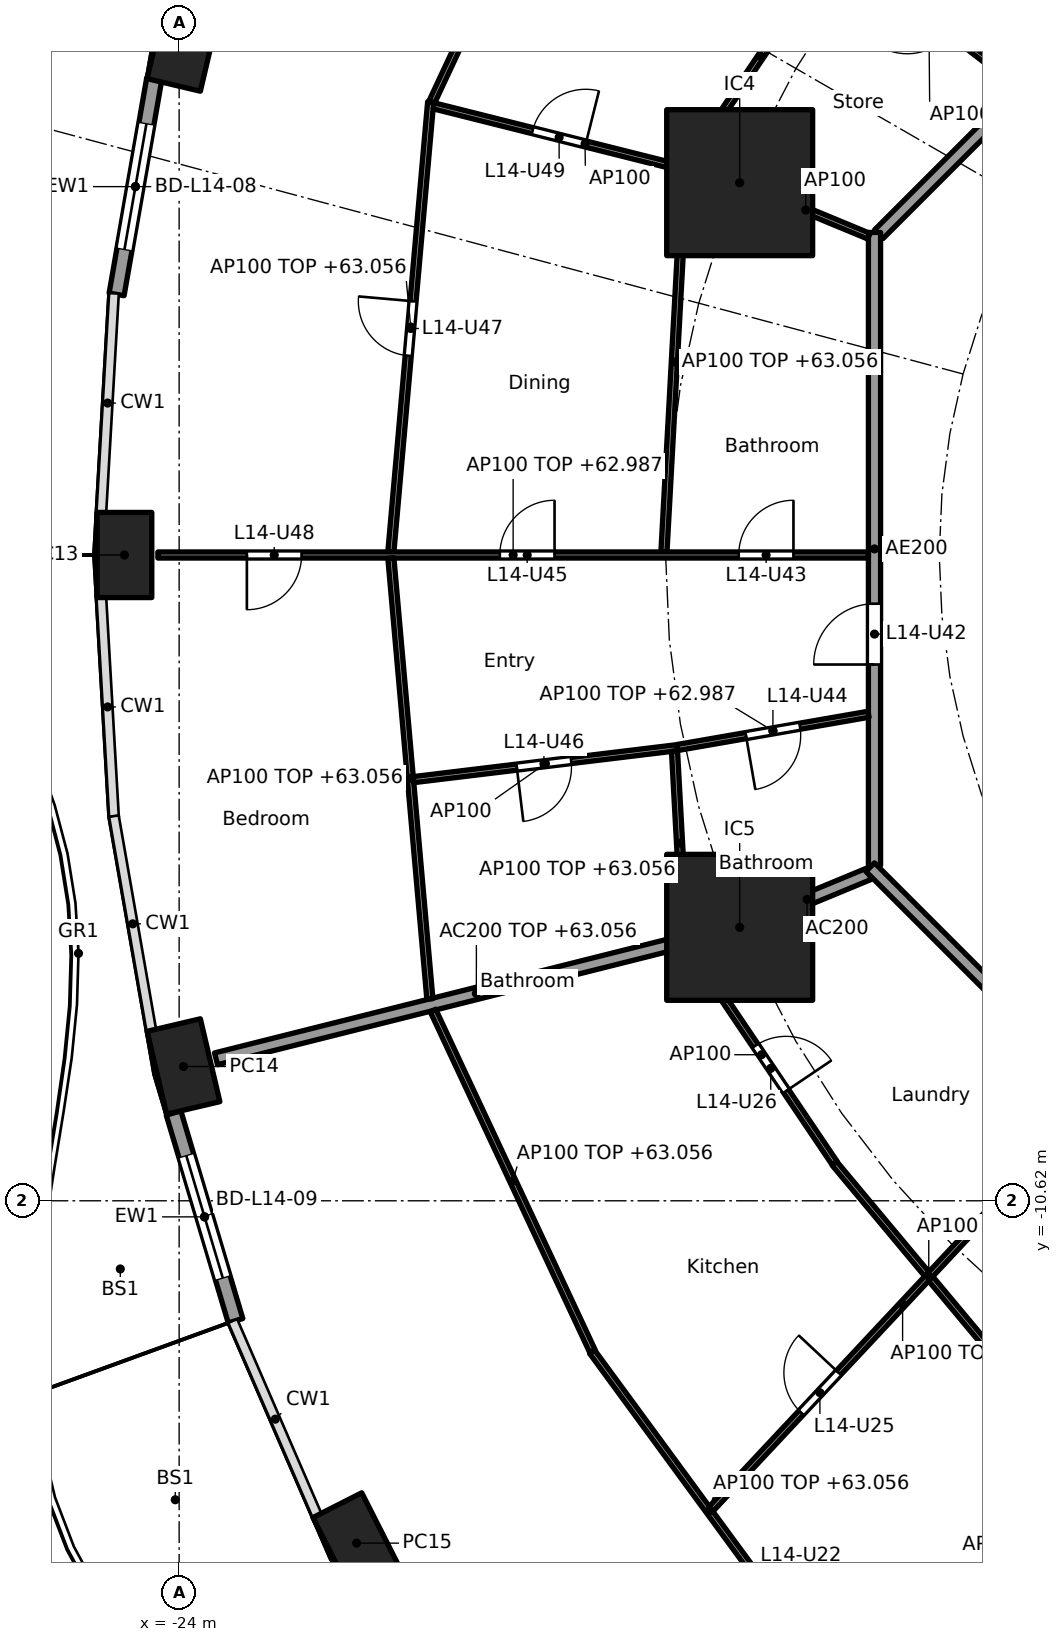
"""IFC4 building model, lengths in metres.
Left out: names, types, materials, properties, quantities, classifications, styles, units other than length and angle.
Written with IfcOpenShell. Run it as: python <this file> out.ifc"""

import sys

from ifc_helpers import new_model, si_unit, direction, frame, frame_2d, origin, origin_2d, place, context, subcontext, project, spatial, rectangle, hollow_rectangle, extrude, element, fill, save


model = new_model("IFC4")
c1 = context("Model", 3, precision=1e-05, world=origin(), true_north=direction((0.0, 1.0)))
c2 = subcontext(c1, "Body", "Model", "MODEL_VIEW")
j1 = project(units=[si_unit("LENGTHUNIT", "METRE"), si_unit("PLANEANGLEUNIT", "RADIAN")], contexts=[c1])
p1 = place(None, origin())
s1 = spatial("IfcSite", under=j1, at=p1, CompositionType="ELEMENT")
p2 = place(p1, origin())
s2 = spatial("IfcBuilding", under=s1, at=p2, CompositionType="ELEMENT")
p3 = place(p2, frame((0.0, 0.0, 60.3)))
s3 = spatial("IfcBuildingStorey", under=s2, at=p3, CompositionType="ELEMENT", Elevation=60.3)
for number, where, z_axis, x_axis in (
    (1, (-23.929, 8.412, 0.0), (0.0, 0.0, 1.0), (-0.229, -0.973, 0.0)),
    (2, (-24.9, 0.0, 0.0), (0.0, 0.0, 1.0), (0.0, -1.0, 0.0)),
    (3, (-23.929, -8.412, 0.0), (0.0, 0.0, 1.0), (0.229, -0.973, 0.0)),
    (4, (-21.082, -16.25, 0.0), (0.0, 0.0, 1.0), (0.452, -0.892, 0.0)),
):
    element("IfcColumn", number, at=place(p3, frame(where, z_axis=z_axis, x_axis=x_axis)), inside=s3, PredefinedType="COLUMN", context=c2, shape_type="SweptSolid", body=[
        extrude(hollow_rectangle(XDim=1.4, YDim=0.9, WallThickness=0.05, at=origin_2d()), origin(), (0.0, 0.0, 1.0), 3.7),
    ])
for number, where, z_axis, x_axis in (
    (5, (-14.782, 6.123, 0.0), (0.0, 0.0, 1.0), (1.0, 0.0, 0.0)),
    (6, (-14.782, -6.123, 0.0), (0.0, 0.0, 1.0), (1.0, 0.0, 0.0)),
):
    element("IfcColumn", number, at=place(p3, frame(where, z_axis=z_axis, x_axis=x_axis)), inside=s3, PredefinedType="COLUMN", context=c2, shape_type="SweptSolid", body=[
        extrude(rectangle(XDim=2.4, YDim=2.4, at=origin_2d()), origin(), (0.0, 0.0, 1.0), 3.7),
    ])
p4 = place(p3, frame((-25.029, 4.286, 0.0), z_axis=(0.0, 0.0, 1.0), x_axis=(0.172217377323, 0.98505897029, 0.0)))
e7 = element("IfcWall", 7, at=p4, inside=s3, PredefinedType="SOLIDWALL", context=c2, shape_type="SweptSolid", body=[
    extrude(rectangle(XDim=3.598, YDim=0.25, at=frame_2d((1.799, 0.0))), origin(), (0.0, 0.0, 1.0), 3.44),
])
p5 = place(p4, frame((0.749, 0.0, 0.0)))
e8 = element("IfcOpeningElement", 8, at=p5, cuts=e7, PredefinedType="OPENING", context=c2, shape_type="SweptSolid", body=[
    extrude(rectangle(XDim=2.1, YDim=2.4, at=frame_2d((1.05, 1.2))), frame((0.0, 0.135, 0.0), z_axis=(0.0, -1.0, 0.0), x_axis=(1.0, 0.0, 0.0)), (0.0, 0.0, 1.0), 0.27),
])
p6 = place(p3, frame((-23.073, -12.593, 0.0), z_axis=(0.0, 0.0, 1.0), x_axis=(-0.285871309426, 0.958268018065, 0.0)))
e9 = element("IfcWall", 9, at=p6, inside=s3, PredefinedType="SOLIDWALL", context=c2, shape_type="SweptSolid", body=[
    extrude(rectangle(XDim=3.565, YDim=0.25, at=frame_2d((1.783, 0.0))), origin(), (0.0, 0.0, 1.0), 3.44),
])
p7 = place(p6, frame((0.733, 0.0, 0.0)))
e10 = element("IfcOpeningElement", 10, at=p7, cuts=e9, PredefinedType="OPENING", context=c2, shape_type="SweptSolid", body=[
    extrude(rectangle(XDim=2.1, YDim=2.4, at=frame_2d((1.05, 1.2))), frame((0.0, 0.135, 0.0), z_axis=(0.0, -1.0, 0.0), x_axis=(1.0, 0.0, 0.0)), (0.0, 0.0, 1.0), 0.27),
])
p8 = place(p3, frame((-12.657, -5.243, 0.0), z_axis=(0.0, 0.0, 1.0), x_axis=(-0.923885664896, -0.382668627144, 0.0)))
e11 = element("IfcWall", 11, at=p8, inside=s3, PredefinedType="PARTITIONING", context=c2, shape_type="SweptSolid", body=[
    extrude(rectangle(XDim=2.2, YDim=0.2, at=frame_2d((1.1, 0.0))), origin(), (0.0, 0.0, 1.0), 3.44),
])
p9 = place(p3, frame((-14.831, -6.135, 0.0), z_axis=(0.0, 0.0, 1.0), x_axis=(-0.969884949569, -0.243563512454, 0.0)))
e12 = element("IfcWall", 12, at=p9, inside=s3, PredefinedType="PARTITIONING", context=c2, shape_type="SweptSolid", body=[
    extrude(rectangle(XDim=8.829, YDim=0.2, at=frame_2d((4.415, 0.0))), origin(), (0.0, 0.0, 1.0), 2.756),
])
p10 = place(p3, frame((-5.275, 12.494, 0.0), z_axis=(0.0, 0.0, 1.0), x_axis=(-0.707106781187, -0.707106781187, 0.0)))
e13 = element("IfcWall", 13, at=p10, inside=s3, PredefinedType="PARTITIONING", context=c2, shape_type="SweptSolid", body=[
    extrude(rectangle(XDim=10.209, YDim=0.2, at=frame_2d((5.104, 0.0))), origin(), (0.0, 0.0, 1.0), 3.44),
])
p11 = place(p3, frame((-12.565, 5.304, 0.0), z_axis=(0.0, 0.0, 1.0), x_axis=(0.0, -1.0, 0.0)))
e14 = element("IfcWall", 14, at=p11, inside=s3, PredefinedType="PARTITIONING", context=c2, shape_type="SweptSolid", body=[
    extrude(rectangle(XDim=10.409, YDim=0.2, at=frame_2d((5.205, 0.0))), origin(), (0.0, 0.0, 1.0), 3.44),
])
p12 = place(p11, frame((6.106, 0.0, 0.0)))
e15 = element("IfcOpeningElement", 15, at=p12, cuts=e14, PredefinedType="OPENING", context=c2, shape_type="SweptSolid", body=[
    extrude(rectangle(XDim=1.0, YDim=2.1, at=frame_2d((0.5, 1.05))), frame((0.0, 0.11, 0.0), z_axis=(0.0, -1.0, 0.0), x_axis=(1.0, 0.0, 0.0)), (0.0, 0.0, 1.0), 0.22),
])
p13 = place(p3, frame((-12.635, -5.134, 0.0), z_axis=(0.0, 0.0, 1.0), x_axis=(0.707106781187, -0.707106781187, 0.0)))
e16 = element("IfcWall", 16, at=p13, inside=s3, PredefinedType="PARTITIONING", context=c2, shape_type="SweptSolid", body=[
    extrude(rectangle(XDim=10.609, YDim=0.2, at=frame_2d((5.305, 0.0))), origin(), (0.0, 0.0, 1.0), 3.44),
])
p14 = place(p3, frame((-10.19, 7.719, 0.0), z_axis=(0.0, 0.0, 1.0), x_axis=(-0.790253294643, 0.612780327937, 0.0)))
e17 = element("IfcWall", 17, at=p14, inside=s3, PredefinedType="PARTITIONING", context=c2, shape_type="SweptSolid", body=[
    extrude(rectangle(XDim=3.746, YDim=0.1, at=frame_2d((1.873, 0.0))), origin(), (0.0, 0.0, 1.0), 2.687),
])
p15 = place(p14, frame((1.423, 0.0, 0.0)))
e18 = element("IfcOpeningElement", 18, at=p15, cuts=e17, PredefinedType="OPENING", context=c2, shape_type="SweptSolid", body=[
    extrude(rectangle(XDim=0.9, YDim=2.1, at=frame_2d((0.45, 1.05))), frame((0.0, 0.06, 0.0), z_axis=(0.0, -1.0, 0.0), x_axis=(1.0, 0.0, 0.0)), (0.0, 0.0, 1.0), 0.12),
])
p16 = place(p3, frame((-13.218, 10.004, 0.0), z_axis=(0.0, 0.0, 1.0), x_axis=(-0.559126445155, -0.82908239538, 0.0)))
e19 = element("IfcWall", 19, at=p16, inside=s3, PredefinedType="PARTITIONING", context=c2, shape_type="SweptSolid", body=[
    extrude(rectangle(XDim=4.358, YDim=0.1, at=frame_2d((2.179, 0.0))), origin(), (0.0, 0.0, 1.0), 3.44),
])
p17 = place(p3, frame((-17.203, 13.095, 0.0), z_axis=(0.0, 0.0, 1.0), x_axis=(-0.423892287987, -0.905712607942, 0.0)))
e20 = element("IfcWall", 20, at=p17, inside=s3, PredefinedType="PARTITIONING", context=c2, shape_type="SweptSolid", body=[
    extrude(rectangle(XDim=6.238, YDim=0.1, at=frame_2d((3.119, 0.0))), origin(), (0.0, 0.0, 1.0), 2.756),
])
p18 = place(p3, frame((-12.657, 5.243, 0.0), z_axis=(0.0, 0.0, 1.0), x_axis=(-0.923864733477, 0.382719158442, 0.0)))
e21 = element("IfcWall", 21, at=p18, inside=s3, PredefinedType="PARTITIONING", context=c2, shape_type="SweptSolid", body=[
    extrude(rectangle(XDim=2.25, YDim=0.1, at=frame_2d((1.125, 0.0))), origin(), (0.0, 0.0, 1.0), 3.44),
])
p19 = place(p3, frame((-14.831, 6.135, 0.0), z_axis=(0.0, 0.0, 1.0), x_axis=(-0.96988230015, 0.243574062362, 0.0)))
e22 = element("IfcWall", 22, at=p19, inside=s3, PredefinedType="PARTITIONING", context=c2, shape_type="SweptSolid", body=[
    extrude(rectangle(XDim=5.144, YDim=0.1, at=frame_2d((2.572, 0.0))), origin(), (0.0, 0.0, 1.0), 3.44),
])
p20 = place(p19, frame((2.561, 0.0, 0.0)))
e23 = element("IfcOpeningElement", 23, at=p20, cuts=e22, PredefinedType="OPENING", context=c2, shape_type="SweptSolid", body=[
    extrude(rectangle(XDim=0.9, YDim=2.1, at=frame_2d((0.45, 1.05))), frame((0.0, 0.06, 0.0), z_axis=(0.0, -1.0, 0.0), x_axis=(1.0, 0.0, 0.0)), (0.0, 0.0, 1.0), 0.12),
])
p21 = place(p3, frame((-15.686, 6.299, 0.0), z_axis=(0.0, 0.0, 1.0), x_axis=(-0.054651178503, -0.99850550759, 0.0)))
e24 = element("IfcWall", 24, at=p21, inside=s3, PredefinedType="PARTITIONING", context=c2, shape_type="SweptSolid", body=[
    extrude(rectangle(XDim=6.259, YDim=0.1, at=frame_2d((3.129, 0.0))), origin(), (0.0, 0.0, 1.0), 2.756),
])
p22 = place(p3, frame((-19.864, 7.45, 0.0), z_axis=(0.0, 0.0, 1.0), x_axis=(-0.088138375539, -0.996108240483, 0.0)))
e25 = element("IfcWall", 25, at=p22, inside=s3, PredefinedType="PARTITIONING", context=c2, shape_type="SweptSolid", body=[
    extrude(rectangle(XDim=7.429, YDim=0.1, at=frame_2d((3.714, 0.0))), origin(), (0.0, 0.0, 1.0), 2.756),
])
p23 = place(p22, frame((3.29, 0.0, 0.0)))
e26 = element("IfcOpeningElement", 26, at=p23, cuts=e25, PredefinedType="OPENING", context=c2, shape_type="SweptSolid", body=[
    extrude(rectangle(XDim=0.9, YDim=2.1, at=frame_2d((0.45, 1.05))), frame((0.0, 0.06, 0.0), z_axis=(0.0, -1.0, 0.0), x_axis=(1.0, 0.0, 0.0)), (0.0, 0.0, 1.0), 0.12),
])
p24 = place(p3, frame((-12.665, 0.0, 0.0), z_axis=(0.0, 0.0, 1.0), x_axis=(-1.0, 0.0, 0.0)))
e27 = element("IfcWall", 27, at=p24, inside=s3, PredefinedType="PARTITIONING", context=c2, shape_type="SweptSolid", body=[
    extrude(rectangle(XDim=11.685, YDim=0.1, at=frame_2d((5.843, 0.0))), origin(), (0.0, 0.0, 1.0), 2.687),
])
p25 = place(p24, frame((1.233, 0.0, 0.0)))
e28 = element("IfcOpeningElement", 28, at=p25, cuts=e27, PredefinedType="OPENING", context=c2, shape_type="SweptSolid", body=[
    extrude(rectangle(XDim=0.9, YDim=2.1, at=frame_2d((0.45, 1.05))), frame((0.0, 0.06, 0.0), z_axis=(0.0, -1.0, 0.0), x_axis=(1.0, 0.0, 0.0)), (0.0, 0.0, 1.0), 0.12),
])
p26 = place(p24, frame((5.162, 0.0, 0.0)))
e29 = element("IfcOpeningElement", 29, at=p26, cuts=e27, PredefinedType="OPENING", context=c2, shape_type="SweptSolid", body=[
    extrude(rectangle(XDim=0.9, YDim=2.1, at=frame_2d((0.45, 1.05))), frame((0.0, 0.06, 0.0), z_axis=(0.0, -1.0, 0.0), x_axis=(1.0, 0.0, 0.0)), (0.0, 0.0, 1.0), 0.12),
])
p27 = place(p24, frame((9.322, 0.0, 0.0)))
e30 = element("IfcOpeningElement", 30, at=p27, cuts=e27, PredefinedType="OPENING", context=c2, shape_type="SweptSolid", body=[
    extrude(rectangle(XDim=0.9, YDim=2.1, at=frame_2d((0.45, 1.05))), frame((0.0, 0.06, 0.0), z_axis=(0.0, -1.0, 0.0), x_axis=(1.0, 0.0, 0.0)), (0.0, 0.0, 1.0), 0.12),
])
p28 = place(p3, frame((-20.518, -0.05, 0.0), z_axis=(0.0, 0.0, 1.0), x_axis=(0.088143415068, -0.996107794558, 0.0)))
e31 = element("IfcWall", 31, at=p28, inside=s3, PredefinedType="PARTITIONING", context=c2, shape_type="SweptSolid", body=[
    extrude(rectangle(XDim=7.279, YDim=0.1, at=frame_2d((3.64, 0.0))), origin(), (0.0, 0.0, 1.0), 2.756),
])
p29 = place(p3, frame((-12.663, -2.619, 0.0), z_axis=(0.0, 0.0, 1.0), x_axis=(-0.985220176102, -0.171292745325, 0.0)))
e32 = element("IfcWall", 32, at=p29, inside=s3, PredefinedType="PARTITIONING", context=c2, shape_type="SweptSolid", body=[
    extrude(rectangle(XDim=3.191, YDim=0.1, at=frame_2d((1.596, 0.0))), origin(), (0.0, 0.0, 1.0), 2.687),
])
p30 = place(p29, frame((1.146, 0.0, 0.0)))
e33 = element("IfcOpeningElement", 33, at=p30, cuts=e32, PredefinedType="OPENING", context=c2, shape_type="SweptSolid", body=[
    extrude(rectangle(XDim=0.9, YDim=2.1, at=frame_2d((0.45, 1.05))), frame((0.0, 0.06, 0.0), z_axis=(0.0, -1.0, 0.0), x_axis=(1.0, 0.0, 0.0)), (0.0, 0.0, 1.0), 0.12),
])
p31 = place(p3, frame((-15.807, -3.168, 0.0), z_axis=(0.0, 0.0, 1.0), x_axis=(-0.992741666002, -0.120266306938, 0.0)))
e34 = element("IfcWall", 34, at=p31, inside=s3, PredefinedType="PARTITIONING", context=c2, shape_type="SweptSolid", body=[
    extrude(rectangle(XDim=4.371, YDim=0.1, at=frame_2d((2.185, 0.0))), origin(), (0.0, 0.0, 1.0), 3.44),
])
p32 = place(p31, frame((1.76, 0.0, 0.0)))
e35 = element("IfcOpeningElement", 35, at=p32, cuts=e34, PredefinedType="OPENING", context=c2, shape_type="SweptSolid", body=[
    extrude(rectangle(XDim=0.9, YDim=2.1, at=frame_2d((0.45, 1.05))), frame((0.0, 0.06, 0.0), z_axis=(0.0, -1.0, 0.0), x_axis=(1.0, 0.0, 0.0)), (0.0, 0.0, 1.0), 0.12),
])
p33 = place(p3, frame((-15.854, -3.225, 0.0), z_axis=(0.0, 0.0, 1.0), x_axis=(0.054644199943, -0.998505889523, 0.0)))
e36 = element("IfcWall", 36, at=p33, inside=s3, PredefinedType="PARTITIONING", context=c2, shape_type="SweptSolid", body=[
    extrude(rectangle(XDim=3.029, YDim=0.1, at=frame_2d((1.515, 0.0))), origin(), (0.0, 0.0, 1.0), 2.756),
])
p34 = place(p3, frame((-15.627, -6.432, 0.0), z_axis=(0.0, 0.0, 1.0), x_axis=(0.559112679527, -0.829091678641, 0.0)))
e37 = element("IfcWall", 37, at=p34, inside=s3, PredefinedType="PARTITIONING", context=c2, shape_type="SweptSolid", body=[
    extrude(rectangle(XDim=4.308, YDim=0.1, at=frame_2d((2.154, 0.0))), origin(), (0.0, 0.0, 1.0), 3.44),
])
p35 = place(p34, frame((1.975, 0.0, 0.0)))
e38 = element("IfcOpeningElement", 38, at=p35, cuts=e37, PredefinedType="OPENING", context=c2, shape_type="SweptSolid", body=[
    extrude(rectangle(XDim=0.9, YDim=2.1, at=frame_2d((0.45, 1.05))), frame((0.0, 0.06, 0.0), z_axis=(0.0, -1.0, 0.0), x_axis=(1.0, 0.0, 0.0)), (0.0, 0.0, 1.0), 0.12),
])
p36 = place(p3, frame((-19.826, -7.491, 0.0), z_axis=(0.0, 0.0, 1.0), x_axis=(0.423926333401, -0.905696673202, 0.0)))
e39 = element("IfcWall", 39, at=p36, inside=s3, PredefinedType="PARTITIONING", context=c2, shape_type="SweptSolid", body=[
    extrude(rectangle(XDim=6.188, YDim=0.1, at=frame_2d((3.094, 0.0))), origin(), (0.0, 0.0, 1.0), 2.756),
])
p37 = place(p3, frame((-13.222, -10.007, 0.0), z_axis=(0.0, 0.0, 1.0), x_axis=(0.64083455704, -0.767679015282, 0.0)))
e40 = element("IfcWall", 40, at=p37, inside=s3, PredefinedType="PARTITIONING", context=c2, shape_type="SweptSolid", body=[
    extrude(rectangle(XDim=4.837, YDim=0.1, at=frame_2d((2.418, 0.0))), origin(), (0.0, 0.0, 1.0), 2.756),
])
p38 = place(p3, frame((-17.211, -13.1, 0.0), z_axis=(0.0, 0.0, 1.0), x_axis=(0.591191311491, -0.806531359104, 0.0)))
e41 = element("IfcWall", 41, at=p38, inside=s3, PredefinedType="PARTITIONING", context=c2, shape_type="SweptSolid", body=[
    extrude(rectangle(XDim=6.51, YDim=0.1, at=frame_2d((3.255, 0.0))), origin(), (0.0, 0.0, 1.0), 2.756),
])
p39 = place(p38, frame((4.407, 0.0, 0.0)))
e42 = element("IfcOpeningElement", 42, at=p39, cuts=e41, PredefinedType="OPENING", context=c2, shape_type="SweptSolid", body=[
    extrude(rectangle(XDim=0.9, YDim=2.1, at=frame_2d((0.45, 1.05))), frame((0.0, 0.06, 0.0), z_axis=(0.0, -1.0, 0.0), x_axis=(1.0, 0.0, 0.0)), (0.0, 0.0, 1.0), 0.12),
])
p40 = place(p3, frame((-8.953, -8.958, 0.0), z_axis=(0.0, 0.0, 1.0), x_axis=(-0.683322485948, -0.730116689439, 0.0)))
e43 = element("IfcWall", 43, at=p40, inside=s3, PredefinedType="PARTITIONING", context=c2, shape_type="SweptSolid", body=[
    extrude(rectangle(XDim=9.219, YDim=0.1, at=frame_2d((4.609, 0.0))), origin(), (0.0, 0.0, 1.0), 2.687),
])
p41 = place(p40, frame((6.149, 0.0, 0.0)))
e44 = element("IfcOpeningElement", 44, at=p41, cuts=e43, PredefinedType="OPENING", context=c2, shape_type="SweptSolid", body=[
    extrude(rectangle(XDim=0.9, YDim=2.1, at=frame_2d((0.45, 1.05))), frame((0.0, 0.06, 0.0), z_axis=(0.0, -1.0, 0.0), x_axis=(1.0, 0.0, 0.0)), (0.0, 0.0, 1.0), 0.12),
])
p42 = place(p5, origin())
e45 = element("IfcDoor", 45, at=p42, inside=s3, OperationType="SLIDING_TO_LEFT", PredefinedType="DOOR", context=c2, shape_type="SweptSolid", body=[
    extrude(rectangle(XDim=2.1, YDim=2.4, at=frame_2d((1.05, 1.2))), frame((0.0, 0.025, 0.0), z_axis=(0.0, -1.0, 0.0), x_axis=(1.0, 0.0, 0.0)), (0.0, 0.0, 1.0), 0.05),
])
fill(e8, e45)
p43 = place(p7, origin())
e46 = element("IfcDoor", 46, at=p43, inside=s3, OperationType="SLIDING_TO_LEFT", PredefinedType="DOOR", context=c2, shape_type="SweptSolid", body=[
    extrude(rectangle(XDim=2.1, YDim=2.4, at=frame_2d((1.05, 1.2))), frame((0.0, 0.025, 0.0), z_axis=(0.0, -1.0, 0.0), x_axis=(1.0, 0.0, 0.0)), (0.0, 0.0, 1.0), 0.05),
])
fill(e10, e46)
p44 = place(p41, frame((0.9, 0.0, 0.0), x_axis=(-1.0, 0.0, 0.0)))
e47 = element("IfcDoor", 47, at=p44, inside=s3, OperationType="SINGLE_SWING_RIGHT", PredefinedType="DOOR", context=c2, shape_type="SweptSolid", body=[
    extrude(rectangle(XDim=0.9, YDim=2.1, at=frame_2d((0.45, 1.05))), frame((0.0, 0.025, 0.0), z_axis=(0.0, -1.0, 0.0), x_axis=(1.0, 0.0, 0.0)), (0.0, 0.0, 1.0), 0.05),
])
fill(e44, e47)
p45 = place(p35, origin())
e48 = element("IfcDoor", 48, at=p45, inside=s3, OperationType="SINGLE_SWING_RIGHT", PredefinedType="DOOR", context=c2, shape_type="SweptSolid", body=[
    extrude(rectangle(XDim=0.9, YDim=2.1, at=frame_2d((0.45, 1.05))), frame((0.0, 0.025, 0.0), z_axis=(0.0, -1.0, 0.0), x_axis=(1.0, 0.0, 0.0)), (0.0, 0.0, 1.0), 0.05),
])
fill(e38, e48)
p46 = place(p12, frame((1.0, 0.0, 0.0), x_axis=(-1.0, 0.0, 0.0)))
e49 = element("IfcDoor", 49, at=p46, inside=s3, OperationType="SINGLE_SWING_LEFT", PredefinedType="DOOR", context=c2, shape_type="SweptSolid", body=[
    extrude(rectangle(XDim=1.0, YDim=2.1, at=frame_2d((0.5, 1.05))), frame((0.0, 0.025, 0.0), z_axis=(0.0, -1.0, 0.0), x_axis=(1.0, 0.0, 0.0)), (0.0, 0.0, 1.0), 0.05),
])
fill(e15, e49)
p47 = place(p25, frame((0.9, 0.0, 0.0), x_axis=(-1.0, 0.0, 0.0)))
e50 = element("IfcDoor", 50, at=p47, inside=s3, OperationType="SINGLE_SWING_RIGHT", PredefinedType="DOOR", context=c2, shape_type="SweptSolid", body=[
    extrude(rectangle(XDim=0.9, YDim=2.1, at=frame_2d((0.45, 1.05))), frame((0.0, 0.025, 0.0), z_axis=(0.0, -1.0, 0.0), x_axis=(1.0, 0.0, 0.0)), (0.0, 0.0, 1.0), 0.05),
])
fill(e28, e50)
p48 = place(p30, origin())
e51 = element("IfcDoor", 51, at=p48, inside=s3, OperationType="SINGLE_SWING_RIGHT", PredefinedType="DOOR", context=c2, shape_type="SweptSolid", body=[
    extrude(rectangle(XDim=0.9, YDim=2.1, at=frame_2d((0.45, 1.05))), frame((0.0, 0.025, 0.0), z_axis=(0.0, -1.0, 0.0), x_axis=(1.0, 0.0, 0.0)), (0.0, 0.0, 1.0), 0.05),
])
fill(e33, e51)
p49 = place(p26, frame((0.9, 0.0, 0.0), x_axis=(-1.0, 0.0, 0.0)))
e52 = element("IfcDoor", 52, at=p49, inside=s3, OperationType="SINGLE_SWING_RIGHT", PredefinedType="DOOR", context=c2, shape_type="SweptSolid", body=[
    extrude(rectangle(XDim=0.9, YDim=2.1, at=frame_2d((0.45, 1.05))), frame((0.0, 0.025, 0.0), z_axis=(0.0, -1.0, 0.0), x_axis=(1.0, 0.0, 0.0)), (0.0, 0.0, 1.0), 0.05),
])
fill(e29, e52)
p50 = place(p32, origin())
e53 = element("IfcDoor", 53, at=p50, inside=s3, OperationType="SINGLE_SWING_RIGHT", PredefinedType="DOOR", context=c2, shape_type="SweptSolid", body=[
    extrude(rectangle(XDim=0.9, YDim=2.1, at=frame_2d((0.45, 1.05))), frame((0.0, 0.025, 0.0), z_axis=(0.0, -1.0, 0.0), x_axis=(1.0, 0.0, 0.0)), (0.0, 0.0, 1.0), 0.05),
])
fill(e35, e53)
p51 = place(p23, frame((0.9, 0.0, 0.0), x_axis=(-1.0, 0.0, 0.0)))
e54 = element("IfcDoor", 54, at=p51, inside=s3, OperationType="SINGLE_SWING_RIGHT", PredefinedType="DOOR", context=c2, shape_type="SweptSolid", body=[
    extrude(rectangle(XDim=0.9, YDim=2.1, at=frame_2d((0.45, 1.05))), frame((0.0, 0.025, 0.0), z_axis=(0.0, -1.0, 0.0), x_axis=(1.0, 0.0, 0.0)), (0.0, 0.0, 1.0), 0.05),
])
fill(e26, e54)
p52 = place(p27, origin())
e55 = element("IfcDoor", 55, at=p52, inside=s3, OperationType="SINGLE_SWING_RIGHT", PredefinedType="DOOR", context=c2, shape_type="SweptSolid", body=[
    extrude(rectangle(XDim=0.9, YDim=2.1, at=frame_2d((0.45, 1.05))), frame((0.0, 0.025, 0.0), z_axis=(0.0, -1.0, 0.0), x_axis=(1.0, 0.0, 0.0)), (0.0, 0.0, 1.0), 0.05),
])
fill(e30, e55)
p53 = place(p20, frame((0.9, 0.0, 0.0), x_axis=(-1.0, 0.0, 0.0)))
e56 = element("IfcDoor", 56, at=p53, inside=s3, OperationType="SINGLE_SWING_RIGHT", PredefinedType="DOOR", context=c2, shape_type="SweptSolid", body=[
    extrude(rectangle(XDim=0.9, YDim=2.1, at=frame_2d((0.45, 1.05))), frame((0.0, 0.025, 0.0), z_axis=(0.0, -1.0, 0.0), x_axis=(1.0, 0.0, 0.0)), (0.0, 0.0, 1.0), 0.05),
])
fill(e23, e56)
save(model, sys.argv[1])
